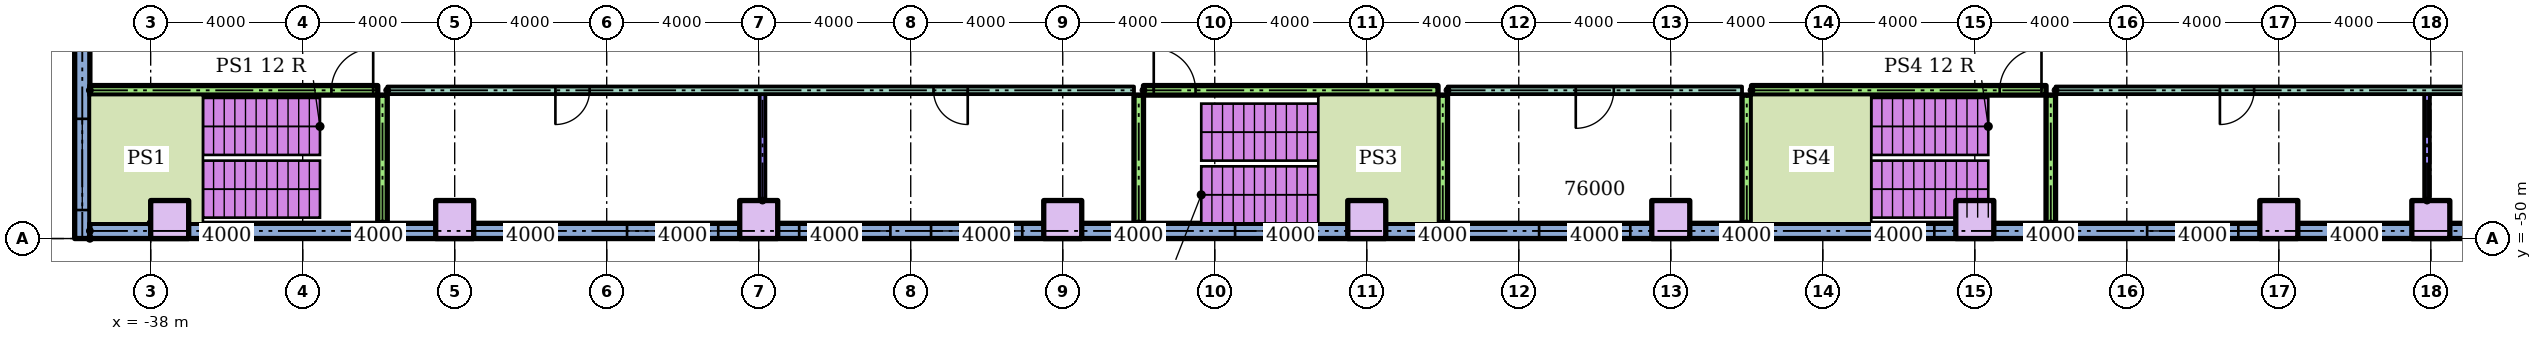
"""IFC4 building model, lengths in metres.
Left out: names, types, materials, properties, quantities, classifications, styles, units other than length and angle.
Written with IfcOpenShell. Run it as: python <this file> out.ifc"""

import sys

from ifc_helpers import new_model, si_unit, direction, frame, frame_2d, origin, origin_2d, place, context, subcontext, project, spatial, rectangle, extrude, element, fill, save


model = new_model("IFC4")
c1 = context("Model", 3, precision=1e-05, world=origin(), true_north=direction((0.0, 1.0)))
c2 = subcontext(c1, "Body", "Model", "MODEL_VIEW")
j1 = project(units=[si_unit("LENGTHUNIT", "METRE"), si_unit("PLANEANGLEUNIT", "RADIAN")], contexts=[c1])
p1 = place(None, origin())
s1 = spatial("IfcSite", under=j1, at=p1, CompositionType="ELEMENT")
p2 = place(p1, origin())
s2 = spatial("IfcBuilding", under=s1, at=p2, CompositionType="ELEMENT")
p3 = place(p2, frame((0.0, 0.0, 10.0)))
s3 = spatial("IfcBuildingStorey", under=s2, at=p3, CompositionType="ELEMENT", Elevation=10.0)
for number, where in (
    (1, (-37.5, -49.5, 0.0)),
    (2, (-30.0, -49.5, 0.0)),
    (3, (-22.0, -49.5, 0.0)),
    (4, (-14.0, -49.5, 0.0)),
    (5, (-6.0, -49.5, 0.0)),
    (6, (2.0, -49.5, 0.0)),
    (7, (10.0, -49.5, 0.0)),
    (8, (18.0, -49.5, 0.0)),
    (9, (22.0, -49.5, 0.0)),
):
    element("IfcColumn", number, at=place(p3, frame(where)), inside=s3, PredefinedType="COLUMN", context=c2, shape_type="SweptSolid", body=[
        extrude(rectangle(XDim=1.0, YDim=1.0, at=origin_2d()), origin(), (0.0, 0.0, 1.0), 4.0),
    ])
p4 = place(p3, frame((-39.8, 20.0, 0.0), z_axis=(0.0, 0.0, 1.0), x_axis=(0.0, -1.0, 0.0)))
e10 = element("IfcWall", 10, at=p4, inside=s3, PredefinedType="STANDARD", context=c2, shape_type="SweptSolid", body=[
    extrude(rectangle(XDim=70.0, YDim=0.4, at=frame_2d((35.0, 0.0))), origin(), (0.0, 0.0, 1.0), 3.7),
])
p5 = place(p4, frame((1.05, 0.0, 0.9)))
e11 = element("IfcOpeningElement", 11, at=p5, cuts=e10, PredefinedType="OPENING", context=c2, shape_type="SweptSolid", body=[
    extrude(rectangle(XDim=2.4, YDim=2.1, at=frame_2d((1.2, 1.05))), frame((0.0, 0.21, 0.0), z_axis=(0.0, -1.0, 0.0), x_axis=(1.0, 0.0, 0.0)), (0.0, 0.0, 1.0), 0.42),
])
p6 = place(p4, frame((5.55, 0.0, 0.9)))
e12 = element("IfcOpeningElement", 12, at=p6, cuts=e10, PredefinedType="OPENING", context=c2, shape_type="SweptSolid", body=[
    extrude(rectangle(XDim=2.4, YDim=2.1, at=frame_2d((1.2, 1.05))), frame((0.0, 0.21, 0.0), z_axis=(0.0, -1.0, 0.0), x_axis=(1.0, 0.0, 0.0)), (0.0, 0.0, 1.0), 0.42),
])
p7 = place(p4, frame((9.863, 0.0, 0.9)))
e13 = element("IfcOpeningElement", 13, at=p7, cuts=e10, PredefinedType="OPENING", context=c2, shape_type="SweptSolid", body=[
    extrude(rectangle(XDim=2.4, YDim=2.1, at=frame_2d((1.2, 1.05))), frame((0.0, 0.21, 0.0), z_axis=(0.0, -1.0, 0.0), x_axis=(1.0, 0.0, 0.0)), (0.0, 0.0, 1.0), 0.42),
])
p8 = place(p4, frame((13.988, 0.0, 0.9)))
e14 = element("IfcOpeningElement", 14, at=p8, cuts=e10, PredefinedType="OPENING", context=c2, shape_type="SweptSolid", body=[
    extrude(rectangle(XDim=2.4, YDim=2.1, at=frame_2d((1.2, 1.05))), frame((0.0, 0.21, 0.0), z_axis=(0.0, -1.0, 0.0), x_axis=(1.0, 0.0, 0.0)), (0.0, 0.0, 1.0), 0.42),
])
p9 = place(p4, frame((18.113, 0.0, 0.9)))
e15 = element("IfcOpeningElement", 15, at=p9, cuts=e10, PredefinedType="OPENING", context=c2, shape_type="SweptSolid", body=[
    extrude(rectangle(XDim=2.4, YDim=2.1, at=frame_2d((1.2, 1.05))), frame((0.0, 0.21, 0.0), z_axis=(0.0, -1.0, 0.0), x_axis=(1.0, 0.0, 0.0)), (0.0, 0.0, 1.0), 0.42),
])
p10 = place(p4, frame((22.238, 0.0, 0.9)))
e16 = element("IfcOpeningElement", 16, at=p10, cuts=e10, PredefinedType="OPENING", context=c2, shape_type="SweptSolid", body=[
    extrude(rectangle(XDim=2.4, YDim=2.1, at=frame_2d((1.2, 1.05))), frame((0.0, 0.21, 0.0), z_axis=(0.0, -1.0, 0.0), x_axis=(1.0, 0.0, 0.0)), (0.0, 0.0, 1.0), 0.42),
])
p11 = place(p4, frame((26.363, 0.0, 0.9)))
e17 = element("IfcOpeningElement", 17, at=p11, cuts=e10, PredefinedType="OPENING", context=c2, shape_type="SweptSolid", body=[
    extrude(rectangle(XDim=2.4, YDim=2.1, at=frame_2d((1.2, 1.05))), frame((0.0, 0.21, 0.0), z_axis=(0.0, -1.0, 0.0), x_axis=(1.0, 0.0, 0.0)), (0.0, 0.0, 1.0), 0.42),
])
p12 = place(p4, frame((30.488, 0.0, 0.9)))
e18 = element("IfcOpeningElement", 18, at=p12, cuts=e10, PredefinedType="OPENING", context=c2, shape_type="SweptSolid", body=[
    extrude(rectangle(XDim=2.4, YDim=2.1, at=frame_2d((1.2, 1.05))), frame((0.0, 0.21, 0.0), z_axis=(0.0, -1.0, 0.0), x_axis=(1.0, 0.0, 0.0)), (0.0, 0.0, 1.0), 0.42),
])
p13 = place(p4, frame((34.613, 0.0, 0.9)))
e19 = element("IfcOpeningElement", 19, at=p13, cuts=e10, PredefinedType="OPENING", context=c2, shape_type="SweptSolid", body=[
    extrude(rectangle(XDim=2.4, YDim=2.1, at=frame_2d((1.2, 1.05))), frame((0.0, 0.21, 0.0), z_axis=(0.0, -1.0, 0.0), x_axis=(1.0, 0.0, 0.0)), (0.0, 0.0, 1.0), 0.42),
])
p14 = place(p4, frame((38.738, 0.0, 0.9)))
e20 = element("IfcOpeningElement", 20, at=p14, cuts=e10, PredefinedType="OPENING", context=c2, shape_type="SweptSolid", body=[
    extrude(rectangle(XDim=2.4, YDim=2.1, at=frame_2d((1.2, 1.05))), frame((0.0, 0.21, 0.0), z_axis=(0.0, -1.0, 0.0), x_axis=(1.0, 0.0, 0.0)), (0.0, 0.0, 1.0), 0.42),
])
p15 = place(p4, frame((42.633, 0.0, 0.9)))
e21 = element("IfcOpeningElement", 21, at=p15, cuts=e10, PredefinedType="OPENING", context=c2, shape_type="SweptSolid", body=[
    extrude(rectangle(XDim=2.4, YDim=2.1, at=frame_2d((1.2, 1.05))), frame((0.0, 0.21, 0.0), z_axis=(0.0, -1.0, 0.0), x_axis=(1.0, 0.0, 0.0)), (0.0, 0.0, 1.0), 0.42),
])
p16 = place(p4, frame((46.3, 0.0, 0.9)))
e22 = element("IfcOpeningElement", 22, at=p16, cuts=e10, PredefinedType="OPENING", context=c2, shape_type="SweptSolid", body=[
    extrude(rectangle(XDim=2.4, YDim=2.1, at=frame_2d((1.2, 1.05))), frame((0.0, 0.21, 0.0), z_axis=(0.0, -1.0, 0.0), x_axis=(1.0, 0.0, 0.0)), (0.0, 0.0, 1.0), 0.42),
])
p17 = place(p4, frame((49.967, 0.0, 0.9)))
e23 = element("IfcOpeningElement", 23, at=p17, cuts=e10, PredefinedType="OPENING", context=c2, shape_type="SweptSolid", body=[
    extrude(rectangle(XDim=2.4, YDim=2.1, at=frame_2d((1.2, 1.05))), frame((0.0, 0.21, 0.0), z_axis=(0.0, -1.0, 0.0), x_axis=(1.0, 0.0, 0.0)), (0.0, 0.0, 1.0), 0.42),
])
p18 = place(p4, frame((66.85, 0.0, 0.9)))
e24 = element("IfcOpeningElement", 24, at=p18, cuts=e10, PredefinedType="OPENING", context=c2, shape_type="SweptSolid", body=[
    extrude(rectangle(XDim=2.4, YDim=2.1, at=frame_2d((1.2, 1.05))), frame((0.0, 0.21, 0.0), z_axis=(0.0, -1.0, 0.0), x_axis=(1.0, 0.0, 0.0)), (0.0, 0.0, 1.0), 0.42),
])
p19 = place(p3, frame((-39.6, -49.8, 0.0)))
e25 = element("IfcWall", 25, at=p19, inside=s3, PredefinedType="STANDARD", context=c2, shape_type="SweptSolid", body=[
    extrude(rectangle(XDim=79.2, YDim=0.4, at=frame_2d((39.6, 0.0))), origin(), (0.0, 0.0, 1.0), 3.7),
])
p20 = place(p19, frame((14.135, 0.0, 0.9)))
e26 = element("IfcOpeningElement", 26, at=p20, cuts=e25, PredefinedType="OPENING", context=c2, shape_type="SweptSolid", body=[
    extrude(rectangle(XDim=2.4, YDim=2.1, at=frame_2d((1.2, 1.05))), frame((0.0, 0.21, 0.0), z_axis=(0.0, -1.0, 0.0), x_axis=(1.0, 0.0, 0.0)), (0.0, 0.0, 1.0), 0.42),
])
p21 = place(p19, frame((18.665, 0.0, 0.9)))
e27 = element("IfcOpeningElement", 27, at=p21, cuts=e25, PredefinedType="OPENING", context=c2, shape_type="SweptSolid", body=[
    extrude(rectangle(XDim=2.4, YDim=2.1, at=frame_2d((1.2, 1.05))), frame((0.0, 0.21, 0.0), z_axis=(0.0, -1.0, 0.0), x_axis=(1.0, 0.0, 0.0)), (0.0, 0.0, 1.0), 0.42),
])
p22 = place(p19, frame((22.135, 0.0, 0.9)))
e28 = element("IfcOpeningElement", 28, at=p22, cuts=e25, PredefinedType="OPENING", context=c2, shape_type="SweptSolid", body=[
    extrude(rectangle(XDim=2.4, YDim=2.1, at=frame_2d((1.2, 1.05))), frame((0.0, 0.21, 0.0), z_axis=(0.0, -1.0, 0.0), x_axis=(1.0, 0.0, 0.0)), (0.0, 0.0, 1.0), 0.42),
])
p23 = place(p19, frame((30.135, 0.0, 0.9)))
e29 = element("IfcOpeningElement", 29, at=p23, cuts=e25, PredefinedType="OPENING", context=c2, shape_type="SweptSolid", body=[
    extrude(rectangle(XDim=2.05, YDim=2.1, at=frame_2d((1.025, 1.05))), frame((0.0, 0.21, 0.0), z_axis=(0.0, -1.0, 0.0), x_axis=(1.0, 0.0, 0.0)), (0.0, 0.0, 1.0), 0.42),
])
p24 = place(p19, frame((38.135, 0.0, 0.9)))
e30 = element("IfcOpeningElement", 30, at=p24, cuts=e25, PredefinedType="OPENING", context=c2, shape_type="SweptSolid", body=[
    extrude(rectangle(XDim=2.4, YDim=2.1, at=frame_2d((1.2, 1.05))), frame((0.0, 0.21, 0.0), z_axis=(0.0, -1.0, 0.0), x_axis=(1.0, 0.0, 0.0)), (0.0, 0.0, 1.0), 0.42),
])
p25 = place(p19, frame((47.015, 0.0, 0.9)))
e31 = element("IfcOpeningElement", 31, at=p25, cuts=e25, PredefinedType="OPENING", context=c2, shape_type="SweptSolid", body=[
    extrude(rectangle(XDim=1.52, YDim=2.1, at=frame_2d((0.76, 1.05))), frame((0.0, 0.21, 0.0), z_axis=(0.0, -1.0, 0.0), x_axis=(1.0, 0.0, 0.0)), (0.0, 0.0, 1.0), 0.42),
])
p26 = place(p19, frame((54.135, 0.0, 0.9)))
e32 = element("IfcOpeningElement", 32, at=p26, cuts=e25, PredefinedType="OPENING", context=c2, shape_type="SweptSolid", body=[
    extrude(rectangle(XDim=2.4, YDim=2.1, at=frame_2d((1.2, 1.05))), frame((0.0, 0.21, 0.0), z_axis=(0.0, -1.0, 0.0), x_axis=(1.0, 0.0, 0.0)), (0.0, 0.0, 1.0), 0.42),
])
p27 = place(p19, frame((66.665, 0.0, 0.9)))
e33 = element("IfcOpeningElement", 33, at=p27, cuts=e25, PredefinedType="OPENING", context=c2, shape_type="SweptSolid", body=[
    extrude(rectangle(XDim=2.4, YDim=2.1, at=frame_2d((1.2, 1.05))), frame((0.0, 0.21, 0.0), z_axis=(0.0, -1.0, 0.0), x_axis=(1.0, 0.0, 0.0)), (0.0, 0.0, 1.0), 0.42),
])
p28 = place(p3, frame((-31.775, -46.1, 0.0)))
e34 = element("IfcWall", 34, at=p28, inside=s3, PredefinedType="PARTITIONING", context=c2, shape_type="SweptSolid", body=[
    extrude(rectangle(XDim=19.65, YDim=0.2, at=frame_2d((9.825, 0.0))), origin(), (0.0, 0.0, 1.0), 3.7),
])
p29 = place(p28, frame((4.425, 0.0, 0.0)))
e35 = element("IfcOpeningElement", 35, at=p29, cuts=e34, PredefinedType="OPENING", context=c2, shape_type="SweptSolid", body=[
    extrude(rectangle(XDim=0.9, YDim=2.1, at=frame_2d((0.45, 1.05))), frame((0.0, 0.11, 0.0), z_axis=(0.0, -1.0, 0.0), x_axis=(1.0, 0.0, 0.0)), (0.0, 0.0, 1.0), 0.22),
])
p30 = place(p28, frame((14.375, 0.0, 0.0)))
e36 = element("IfcOpeningElement", 36, at=p30, cuts=e34, PredefinedType="OPENING", context=c2, shape_type="SweptSolid", body=[
    extrude(rectangle(XDim=0.9, YDim=2.1, at=frame_2d((0.45, 1.05))), frame((0.0, 0.11, 0.0), z_axis=(0.0, -1.0, 0.0), x_axis=(1.0, 0.0, 0.0)), (0.0, 0.0, 1.0), 0.22),
])
p31 = place(p3, frame((-3.875, -46.1, 0.0)))
e37 = element("IfcWall", 37, at=p31, inside=s3, PredefinedType="PARTITIONING", context=c2, shape_type="SweptSolid", body=[
    extrude(rectangle(XDim=7.75, YDim=0.2, at=frame_2d((3.875, 0.0))), origin(), (0.0, 0.0, 1.0), 3.7),
])
p32 = place(p31, frame((3.375, 0.0, 0.0)))
e38 = element("IfcOpeningElement", 38, at=p32, cuts=e37, PredefinedType="OPENING", context=c2, shape_type="SweptSolid", body=[
    extrude(rectangle(XDim=1.0, YDim=2.1, at=frame_2d((0.5, 1.05))), frame((0.0, 0.11, 0.0), z_axis=(0.0, -1.0, 0.0), x_axis=(1.0, 0.0, 0.0)), (0.0, 0.0, 1.0), 0.22),
])
p33 = place(p3, frame((12.125, -46.1, 0.0)))
e39 = element("IfcWall", 39, at=p33, inside=s3, PredefinedType="PARTITIONING", context=c2, shape_type="SweptSolid", body=[
    extrude(rectangle(XDim=19.65, YDim=0.2, at=frame_2d((9.825, 0.0))), origin(), (0.0, 0.0, 1.0), 3.7),
])
p34 = place(p33, frame((4.325, 0.0, 0.0)))
e40 = element("IfcOpeningElement", 40, at=p34, cuts=e39, PredefinedType="OPENING", context=c2, shape_type="SweptSolid", body=[
    extrude(rectangle(XDim=0.9, YDim=2.1, at=frame_2d((0.45, 1.05))), frame((0.0, 0.11, 0.0), z_axis=(0.0, -1.0, 0.0), x_axis=(1.0, 0.0, 0.0)), (0.0, 0.0, 1.0), 0.22),
])
p35 = place(p33, frame((14.525, 0.0, 0.0)))
e41 = element("IfcOpeningElement", 41, at=p35, cuts=e39, PredefinedType="OPENING", context=c2, shape_type="SweptSolid", body=[
    extrude(rectangle(XDim=0.9, YDim=2.1, at=frame_2d((0.45, 1.05))), frame((0.0, 0.11, 0.0), z_axis=(0.0, -1.0, 0.0), x_axis=(1.0, 0.0, 0.0)), (0.0, 0.0, 1.0), 0.22),
])
p36 = place(p3, frame((-39.6, -46.1, 0.0)))
e42 = element("IfcWall", 42, at=p36, inside=s3, PredefinedType="SOLIDWALL", context=c2, shape_type="SweptSolid", body=[
    extrude(rectangle(XDim=7.575, YDim=0.25, at=frame_2d((3.788, 0.0))), origin(), (0.0, 0.0, 1.0), 3.7),
])
p37 = place(p36, frame((6.355, 0.0, 0.0)))
e43 = element("IfcOpeningElement", 43, at=p37, cuts=e42, PredefinedType="OPENING", context=c2, shape_type="SweptSolid", body=[
    extrude(rectangle(XDim=1.1, YDim=2.1, at=frame_2d((0.55, 1.05))), frame((0.0, 0.135, 0.0), z_axis=(0.0, -1.0, 0.0), x_axis=(1.0, 0.0, 0.0)), (0.0, 0.0, 1.0), 0.27),
])
p38 = place(p3, frame((-11.875, -46.1, 0.0)))
e44 = element("IfcWall", 44, at=p38, inside=s3, PredefinedType="SOLIDWALL", context=c2, shape_type="SweptSolid", body=[
    extrude(rectangle(XDim=7.75, YDim=0.25, at=frame_2d((3.875, 0.0))), origin(), (0.0, 0.0, 1.0), 3.7),
])
p39 = place(p38, frame((0.27, 0.0, 0.0)))
e45 = element("IfcOpeningElement", 45, at=p39, cuts=e44, PredefinedType="OPENING", context=c2, shape_type="SweptSolid", body=[
    extrude(rectangle(XDim=1.1, YDim=2.1, at=frame_2d((0.55, 1.05))), frame((0.0, 0.135, 0.0), z_axis=(0.0, -1.0, 0.0), x_axis=(1.0, 0.0, 0.0)), (0.0, 0.0, 1.0), 0.27),
])
p40 = place(p3, frame((4.125, -46.1, 0.0)))
e46 = element("IfcWall", 46, at=p40, inside=s3, PredefinedType="SOLIDWALL", context=c2, shape_type="SweptSolid", body=[
    extrude(rectangle(XDim=7.75, YDim=0.25, at=frame_2d((3.875, 0.0))), origin(), (0.0, 0.0, 1.0), 3.7),
])
p41 = place(p40, frame((6.53, 0.0, 0.0)))
e47 = element("IfcOpeningElement", 47, at=p41, cuts=e46, PredefinedType="OPENING", context=c2, shape_type="SweptSolid", body=[
    extrude(rectangle(XDim=1.1, YDim=2.1, at=frame_2d((0.55, 1.05))), frame((0.0, 0.135, 0.0), z_axis=(0.0, -1.0, 0.0), x_axis=(1.0, 0.0, 0.0)), (0.0, 0.0, 1.0), 0.27),
])
p42 = place(p3, frame((-31.9, -49.6, 0.0), z_axis=(0.0, 0.0, 1.0), x_axis=(0.0, 1.0, 0.0)))
e48 = element("IfcWall", 48, at=p42, inside=s3, PredefinedType="SOLIDWALL", context=c2, shape_type="SweptSolid", body=[
    extrude(rectangle(XDim=3.375, YDim=0.25, at=frame_2d((1.688, 0.0))), origin(), (0.0, 0.0, 1.0), 3.7),
])
p43 = place(p3, frame((-21.9, -49.0, 0.0), z_axis=(0.0, 0.0, 1.0), x_axis=(0.0, 1.0, 0.0)))
e49 = element("IfcWall", 49, at=p43, inside=s3, PredefinedType="PARTITIONING", context=c2, shape_type="SweptSolid", body=[
    extrude(rectangle(XDim=2.8, YDim=0.15, at=frame_2d((1.4, 0.0))), origin(), (0.0, 0.0, 1.0), 3.7),
])
for number, where, z_axis, x_axis in (
    (50, (-12.0, -49.6, 0.0), (0.0, 0.0, 1.0), (0.0, 1.0, 0.0)),
    (51, (-4.0, -49.6, 0.0), (0.0, 0.0, 1.0), (0.0, 1.0, 0.0)),
    (52, (4.0, -49.6, 0.0), (0.0, 0.0, 1.0), (0.0, 1.0, 0.0)),
    (53, (12.0, -49.6, 0.0), (0.0, 0.0, 1.0), (0.0, 1.0, 0.0)),
):
    element("IfcWall", number, at=place(p3, frame(where, z_axis=z_axis, x_axis=x_axis)), inside=s3, PredefinedType="SOLIDWALL", context=c2, shape_type="SweptSolid", body=[
        extrude(rectangle(XDim=3.375, YDim=0.25, at=frame_2d((1.688, 0.0))), origin(), (0.0, 0.0, 1.0), 3.7),
    ])
p44 = place(p3, frame((21.9, -49.0, 0.0), z_axis=(0.0, 0.0, 1.0), x_axis=(0.0, 1.0, 0.0)))
e54 = element("IfcWall", 54, at=p44, inside=s3, PredefinedType="PARTITIONING", context=c2, shape_type="SweptSolid", body=[
    extrude(rectangle(XDim=2.8, YDim=0.15, at=frame_2d((1.4, 0.0))), origin(), (0.0, 0.0, 1.0), 3.7),
])
p45 = place(p18, origin())
e55 = element("IfcWindow", 55, at=p45, inside=s3, PartitioningType="SINGLE_PANEL", PredefinedType="WINDOW", context=c2, shape_type="SweptSolid", body=[
    extrude(rectangle(XDim=2.4, YDim=2.1, at=frame_2d((1.2, 1.05))), frame((0.0, 0.03, 0.0), z_axis=(0.0, -1.0, 0.0), x_axis=(1.0, 0.0, 0.0)), (0.0, 0.0, 1.0), 0.06),
])
fill(e24, e55)
p46 = place(p20, origin())
e56 = element("IfcWindow", 56, at=p46, inside=s3, PartitioningType="SINGLE_PANEL", PredefinedType="WINDOW", context=c2, shape_type="SweptSolid", body=[
    extrude(rectangle(XDim=2.4, YDim=2.1, at=frame_2d((1.2, 1.05))), frame((0.0, 0.03, 0.0), z_axis=(0.0, -1.0, 0.0), x_axis=(1.0, 0.0, 0.0)), (0.0, 0.0, 1.0), 0.06),
])
fill(e26, e56)
p47 = place(p21, origin())
e57 = element("IfcWindow", 57, at=p47, inside=s3, PartitioningType="SINGLE_PANEL", PredefinedType="WINDOW", context=c2, shape_type="SweptSolid", body=[
    extrude(rectangle(XDim=2.4, YDim=2.1, at=frame_2d((1.2, 1.05))), frame((0.0, 0.03, 0.0), z_axis=(0.0, -1.0, 0.0), x_axis=(1.0, 0.0, 0.0)), (0.0, 0.0, 1.0), 0.06),
])
fill(e27, e57)
p48 = place(p22, origin())
e58 = element("IfcWindow", 58, at=p48, inside=s3, PartitioningType="SINGLE_PANEL", PredefinedType="WINDOW", context=c2, shape_type="SweptSolid", body=[
    extrude(rectangle(XDim=2.4, YDim=2.1, at=frame_2d((1.2, 1.05))), frame((0.0, 0.03, 0.0), z_axis=(0.0, -1.0, 0.0), x_axis=(1.0, 0.0, 0.0)), (0.0, 0.0, 1.0), 0.06),
])
fill(e28, e58)
p49 = place(p23, origin())
e59 = element("IfcWindow", 59, at=p49, inside=s3, PartitioningType="SINGLE_PANEL", PredefinedType="WINDOW", context=c2, shape_type="SweptSolid", body=[
    extrude(rectangle(XDim=2.05, YDim=2.1, at=frame_2d((1.025, 1.05))), frame((0.0, 0.03, 0.0), z_axis=(0.0, -1.0, 0.0), x_axis=(1.0, 0.0, 0.0)), (0.0, 0.0, 1.0), 0.06),
])
fill(e29, e59)
p50 = place(p24, origin())
e60 = element("IfcWindow", 60, at=p50, inside=s3, PartitioningType="SINGLE_PANEL", PredefinedType="WINDOW", context=c2, shape_type="SweptSolid", body=[
    extrude(rectangle(XDim=2.4, YDim=2.1, at=frame_2d((1.2, 1.05))), frame((0.0, 0.03, 0.0), z_axis=(0.0, -1.0, 0.0), x_axis=(1.0, 0.0, 0.0)), (0.0, 0.0, 1.0), 0.06),
])
fill(e30, e60)
p51 = place(p25, origin())
e61 = element("IfcWindow", 61, at=p51, inside=s3, PartitioningType="SINGLE_PANEL", PredefinedType="WINDOW", context=c2, shape_type="SweptSolid", body=[
    extrude(rectangle(XDim=1.52, YDim=2.1, at=frame_2d((0.76, 1.05))), frame((0.0, 0.03, 0.0), z_axis=(0.0, -1.0, 0.0), x_axis=(1.0, 0.0, 0.0)), (0.0, 0.0, 1.0), 0.06),
])
fill(e31, e61)
p52 = place(p26, origin())
e62 = element("IfcWindow", 62, at=p52, inside=s3, PartitioningType="SINGLE_PANEL", PredefinedType="WINDOW", context=c2, shape_type="SweptSolid", body=[
    extrude(rectangle(XDim=2.4, YDim=2.1, at=frame_2d((1.2, 1.05))), frame((0.0, 0.03, 0.0), z_axis=(0.0, -1.0, 0.0), x_axis=(1.0, 0.0, 0.0)), (0.0, 0.0, 1.0), 0.06),
])
fill(e32, e62)
p53 = place(p29, frame((0.9, 0.0, 0.0), z_axis=(0.0, 0.0, 1.0), x_axis=(-1.0, 0.0, 0.0)))
e63 = element("IfcDoor", 63, at=p53, inside=s3, OperationType="SINGLE_SWING_LEFT", PredefinedType="DOOR", context=c2, shape_type="SweptSolid", body=[
    extrude(rectangle(XDim=0.9, YDim=2.1, at=frame_2d((0.45, 1.05))), frame((0.0, 0.025, 0.0), z_axis=(0.0, -1.0, 0.0), x_axis=(1.0, 0.0, 0.0)), (0.0, 0.0, 1.0), 0.05),
])
fill(e35, e63)
p54 = place(p30, frame((0.9, 0.0, 0.0), z_axis=(0.0, 0.0, 1.0), x_axis=(-1.0, 0.0, 0.0)))
e64 = element("IfcDoor", 64, at=p54, inside=s3, OperationType="SINGLE_SWING_RIGHT", PredefinedType="DOOR", context=c2, shape_type="SweptSolid", body=[
    extrude(rectangle(XDim=0.9, YDim=2.1, at=frame_2d((0.45, 1.05))), frame((0.0, 0.025, 0.0), z_axis=(0.0, -1.0, 0.0), x_axis=(1.0, 0.0, 0.0)), (0.0, 0.0, 1.0), 0.05),
])
fill(e36, e64)
p55 = place(p32, frame((1.0, 0.0, 0.0), z_axis=(0.0, 0.0, 1.0), x_axis=(-1.0, 0.0, 0.0)))
e65 = element("IfcDoor", 65, at=p55, inside=s3, OperationType="SINGLE_SWING_LEFT", PredefinedType="DOOR", context=c2, shape_type="SweptSolid", body=[
    extrude(rectangle(XDim=1.0, YDim=2.1, at=frame_2d((0.5, 1.05))), frame((0.0, 0.025, 0.0), z_axis=(0.0, -1.0, 0.0), x_axis=(1.0, 0.0, 0.0)), (0.0, 0.0, 1.0), 0.05),
])
fill(e38, e65)
p56 = place(p34, frame((0.9, 0.0, 0.0), z_axis=(0.0, 0.0, 1.0), x_axis=(-1.0, 0.0, 0.0)))
e66 = element("IfcDoor", 66, at=p56, inside=s3, OperationType="SINGLE_SWING_LEFT", PredefinedType="DOOR", context=c2, shape_type="SweptSolid", body=[
    extrude(rectangle(XDim=0.9, YDim=2.1, at=frame_2d((0.45, 1.05))), frame((0.0, 0.025, 0.0), z_axis=(0.0, -1.0, 0.0), x_axis=(1.0, 0.0, 0.0)), (0.0, 0.0, 1.0), 0.05),
])
fill(e40, e66)
p57 = place(p37, origin())
e67 = element("IfcDoor", 67, at=p57, inside=s3, OperationType="SINGLE_SWING_RIGHT", PredefinedType="DOOR", context=c2, shape_type="SweptSolid", body=[
    extrude(rectangle(XDim=1.1, YDim=2.1, at=frame_2d((0.55, 1.05))), frame((0.0, 0.025, 0.0), z_axis=(0.0, -1.0, 0.0), x_axis=(1.0, 0.0, 0.0)), (0.0, 0.0, 1.0), 0.05),
])
fill(e43, e67)
p58 = place(p39, origin())
e68 = element("IfcDoor", 68, at=p58, inside=s3, OperationType="SINGLE_SWING_LEFT", PredefinedType="DOOR", context=c2, shape_type="SweptSolid", body=[
    extrude(rectangle(XDim=1.1, YDim=2.1, at=frame_2d((0.55, 1.05))), frame((0.0, 0.025, 0.0), z_axis=(0.0, -1.0, 0.0), x_axis=(1.0, 0.0, 0.0)), (0.0, 0.0, 1.0), 0.05),
])
fill(e45, e68)
p59 = place(p41, origin())
e69 = element("IfcDoor", 69, at=p59, inside=s3, OperationType="SINGLE_SWING_RIGHT", PredefinedType="DOOR", context=c2, shape_type="SweptSolid", body=[
    extrude(rectangle(XDim=1.1, YDim=2.1, at=frame_2d((0.55, 1.05))), frame((0.0, 0.025, 0.0), z_axis=(0.0, -1.0, 0.0), x_axis=(1.0, 0.0, 0.0)), (0.0, 0.0, 1.0), 0.05),
])
fill(e47, e69)
save(model, sys.argv[1])
